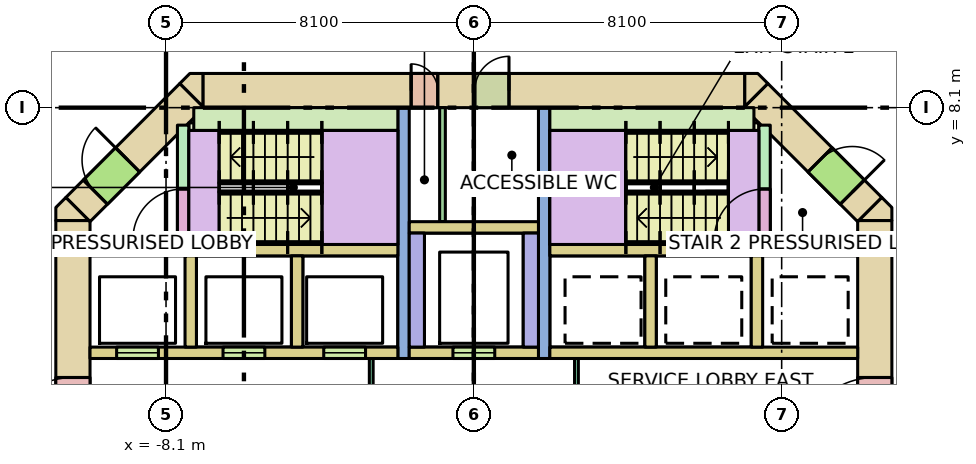
"""IFC4 building model, lengths in metres.
Left out: names, types, materials, properties, quantities, classifications, styles, units other than length and angle.
Written with IfcOpenShell. Run it as: python <this file> out.ifc"""

import sys

from ifc_helpers import new_model, si_unit, direction, frame, frame_2d, origin, place, context, subcontext, project, spatial, polyline, rectangle, outline, extrude, element, fill, save


model = new_model("IFC4")
c1 = context("Model", 3, precision=1e-05, world=origin(), true_north=direction((0.0, 1.0)))
c2 = subcontext(c1, "Body", "Model", "MODEL_VIEW")
j1 = project(units=[si_unit("LENGTHUNIT", "METRE"), si_unit("PLANEANGLEUNIT", "RADIAN")], contexts=[c1])
p1 = place(None, origin())
s1 = spatial("IfcSite", under=j1, at=p1, CompositionType="ELEMENT")
p2 = place(p1, origin())
s2 = spatial("IfcBuilding", under=s1, at=p2, CompositionType="ELEMENT")
p3 = place(p2, frame((0.0, 0.0, 13.0)))
s3 = spatial("IfcBuildingStorey", under=s2, at=p3, CompositionType="ELEMENT", Elevation=13.0)
p4 = place(p3, frame((-7.13, 8.55, -0.32), z_axis=(0.0, 0.0, 1.0), x_axis=(1.0, 0.0, 0.0)))
e1 = element("IfcWall", 1, at=p4, inside=s3, PredefinedType="SHEAR", context=c2, shape_type="SweptSolid", body=[
    extrude(rectangle(XDim=14.26, YDim=0.9, at=frame_2d((7.13, 0.0))), origin(), (0.0, 0.0, 1.0), 7.0),
])
p5 = place(p4, frame((5.48, 0.0, 0.32)))
e2 = element("IfcOpeningElement", 2, at=p5, cuts=e1, PredefinedType="OPENING", context=c2, shape_type="SweptSolid", body=[
    extrude(rectangle(XDim=0.7, YDim=2.1, at=frame_2d((0.35, 1.05))), frame((0.0, 0.46, 0.0), z_axis=(0.0, -1.0, 0.0), x_axis=(1.0, 0.0, 0.0)), (0.0, 0.0, 1.0), 0.92),
])
p6 = place(p4, frame((7.155, 0.0, 0.32)))
e3 = element("IfcOpeningElement", 3, at=p6, cuts=e1, PredefinedType="OPENING", context=c2, shape_type="SweptSolid", body=[
    extrude(rectangle(XDim=0.9, YDim=2.1, at=frame_2d((0.45, 1.05))), frame((0.0, 0.46, 0.0), z_axis=(0.0, -1.0, 0.0), x_axis=(1.0, 0.0, 0.0)), (0.0, 0.0, 1.0), 0.92),
])
p7 = place(p3, frame((-10.55, -5.13, -0.32), z_axis=(0.0, 0.0, 1.0), x_axis=(0.0, 1.0, 0.0)))
e4 = element("IfcWall", 4, at=p7, inside=s3, PredefinedType="SHEAR", context=c2, shape_type="SweptSolid", body=[
    extrude(rectangle(XDim=10.26, YDim=0.9, at=frame_2d((5.13, 0.0))), origin(), (0.0, 0.0, 1.0), 7.0),
])
p8 = place(p7, frame((4.13, 0.0, 0.32)))
e5 = element("IfcOpeningElement", 5, at=p8, cuts=e4, PredefinedType="OPENING", context=c2, shape_type="SweptSolid", body=[
    extrude(rectangle(XDim=2.0, YDim=2.1, at=frame_2d((1.0, 1.05))), frame((0.0, 0.46, 0.0), z_axis=(0.0, -1.0, 0.0), x_axis=(1.0, 0.0, 0.0)), (0.0, 0.0, 1.0), 0.92),
])
p9 = place(p3, frame((10.55, -5.13, -0.32), z_axis=(0.0, 0.0, 1.0), x_axis=(0.0, 1.0, 0.0)))
e6 = element("IfcWall", 6, at=p9, inside=s3, PredefinedType="SHEAR", context=c2, shape_type="SweptSolid", body=[
    extrude(rectangle(XDim=10.26, YDim=0.9, at=frame_2d((5.13, 0.0))), origin(), (0.0, 0.0, 1.0), 7.0),
])
p10 = place(p9, frame((4.13, 0.0, 0.32)))
e7 = element("IfcOpeningElement", 7, at=p10, cuts=e6, PredefinedType="OPENING", context=c2, shape_type="SweptSolid", body=[
    extrude(rectangle(XDim=2.0, YDim=2.1, at=frame_2d((1.0, 1.05))), frame((0.0, 0.46, 0.0), z_axis=(0.0, -1.0, 0.0), x_axis=(1.0, 0.0, 0.0)), (0.0, 0.0, 1.0), 0.92),
])
p11 = place(p3, frame((-10.418, 5.418, -0.32), z_axis=(0.0, 0.0, 1.0), x_axis=(0.707106781187, 0.707106781187, 0.0)))
e8 = element("IfcWall", 8, at=p11, inside=s3, PredefinedType="SHEAR", context=c2, shape_type="SweptSolid", body=[
    extrude(rectangle(XDim=4.243, YDim=0.9, at=frame_2d((2.121, 0.0))), origin(), (0.0, 0.0, 1.0), 7.0),
])
p12 = place(p11, frame((0.65, 0.0, 0.32)))
e9 = element("IfcOpeningElement", 9, at=p12, cuts=e8, PredefinedType="OPENING", context=c2, shape_type="SweptSolid", body=[
    extrude(rectangle(XDim=1.2, YDim=2.1, at=frame_2d((0.6, 1.05))), frame((0.0, 0.46, 0.0), z_axis=(0.0, -1.0, 0.0), x_axis=(1.0, 0.0, 0.0)), (0.0, 0.0, 1.0), 0.92),
])
p13 = place(p3, frame((7.418, 8.418, -0.32), z_axis=(0.0, 0.0, 1.0), x_axis=(0.707106781187, -0.707106781187, 0.0)))
e10 = element("IfcWall", 10, at=p13, inside=s3, PredefinedType="SHEAR", context=c2, shape_type="SweptSolid", body=[
    extrude(rectangle(XDim=4.243, YDim=0.9, at=frame_2d((2.121, 0.0))), origin(), (0.0, 0.0, 1.0), 7.0),
])
p14 = place(p13, frame((2.393, 0.0, 0.32)))
e11 = element("IfcOpeningElement", 11, at=p14, cuts=e10, PredefinedType="OPENING", context=c2, shape_type="SweptSolid", body=[
    extrude(rectangle(XDim=1.2, YDim=2.1, at=frame_2d((0.6, 1.05))), frame((0.0, 0.46, 0.0), z_axis=(0.0, -1.0, 0.0), x_axis=(1.0, 0.0, 0.0)), (0.0, 0.0, 1.0), 0.92),
])
p15 = place(p3, frame((0.0, 0.0, -0.32)))
e12 = element("IfcWall", 12, at=p15, inside=s3, PredefinedType="SHEAR", context=c2, shape_type="SweptSolid", body=[
    extrude(outline(polyline([(-10.736, 5.736), (-10.13, 5.13), (-11.0, 5.13), (-11.0, 5.473), (-10.736, 5.736)])), origin(), (0.0, 0.0, 1.0), 7.0),
])
p16 = place(p3, frame((0.0, 0.0, -0.32)))
e13 = element("IfcWall", 13, at=p16, inside=s3, PredefinedType="SHEAR", context=c2, shape_type="SweptSolid", body=[
    extrude(outline(polyline([(11.0, 5.473), (11.0, 5.13), (10.13, 5.13), (10.736, 5.736), (11.0, 5.473)])), origin(), (0.0, 0.0, 1.0), 7.0),
])
p17 = place(p3, frame((0.0, 0.0, -0.32)))
e14 = element("IfcWall", 14, at=p17, inside=s3, PredefinedType="SHEAR", context=c2, shape_type="SweptSolid", body=[
    extrude(outline(polyline([(-7.473, 9.0), (-7.13, 9.0), (-7.13, 8.13), (-7.736, 8.736), (-7.473, 9.0)])), origin(), (0.0, 0.0, 1.0), 7.0),
])
p18 = place(p3, frame((0.0, 0.0, -0.32)))
e15 = element("IfcWall", 15, at=p18, inside=s3, PredefinedType="SHEAR", context=c2, shape_type="SweptSolid", body=[
    extrude(outline(polyline([(7.473, 9.0), (7.736, 8.736), (7.13, 8.13), (7.13, 9.0), (7.473, 9.0)])), origin(), (0.0, 0.0, 1.0), 7.0),
])
for number, where, z_axis, x_axis in (
    (16, (-10.1, 4.35, 0.0), (0.0, 0.0, 1.0), (1.0, 0.0, 0.0)),
    (17, (2.0, 4.35, 0.0), (0.0, 0.0, 1.0), (1.0, 0.0, 0.0)),
):
    element("IfcWall", number, at=place(p3, frame(where, z_axis=z_axis, x_axis=x_axis)), inside=s3, PredefinedType="SOLIDWALL", context=c2, shape_type="SweptSolid", body=[
        extrude(rectangle(XDim=8.1, YDim=0.3, at=frame_2d((4.05, 0.0))), origin(), (0.0, 0.0, 1.0), 6.68),
    ])
p19 = place(p3, frame((-10.1, 1.65, 0.0), z_axis=(0.0, 0.0, 1.0), x_axis=(1.0, 0.0, 0.0)))
e18 = element("IfcWall", 18, at=p19, inside=s3, PredefinedType="SOLIDWALL", context=c2, shape_type="SweptSolid", body=[
    extrude(rectangle(XDim=8.1, YDim=0.3, at=frame_2d((4.05, 0.0))), origin(), (0.0, 0.0, 1.0), 6.68),
])
p20 = place(p19, frame((0.7, 0.0, 0.0)))
e19 = element("IfcOpeningElement", 19, at=p20, cuts=e18, PredefinedType="OPENING", context=c2, shape_type="SweptSolid", body=[
    extrude(rectangle(XDim=1.1, YDim=2.1, at=frame_2d((0.55, 1.05))), frame((0.0, 0.16, 0.0), z_axis=(0.0, -1.0, 0.0), x_axis=(1.0, 0.0, 0.0)), (0.0, 0.0, 1.0), 0.32),
])
p21 = place(p19, frame((3.5, 0.0, 0.0)))
e20 = element("IfcOpeningElement", 20, at=p21, cuts=e18, PredefinedType="OPENING", context=c2, shape_type="SweptSolid", body=[
    extrude(rectangle(XDim=1.1, YDim=2.1, at=frame_2d((0.55, 1.05))), frame((0.0, 0.16, 0.0), z_axis=(0.0, -1.0, 0.0), x_axis=(1.0, 0.0, 0.0)), (0.0, 0.0, 1.0), 0.32),
])
p22 = place(p19, frame((6.15, 0.0, 0.0)))
e21 = element("IfcOpeningElement", 21, at=p22, cuts=e18, PredefinedType="OPENING", context=c2, shape_type="SweptSolid", body=[
    extrude(rectangle(XDim=1.1, YDim=2.1, at=frame_2d((0.55, 1.05))), frame((0.0, 0.16, 0.0), z_axis=(0.0, -1.0, 0.0), x_axis=(1.0, 0.0, 0.0)), (0.0, 0.0, 1.0), 0.32),
])
p23 = place(p3, frame((2.0, 1.65, 0.0), z_axis=(0.0, 0.0, 1.0), x_axis=(1.0, 0.0, 0.0)))
e22 = element("IfcWall", 22, at=p23, inside=s3, PredefinedType="SOLIDWALL", context=c2, shape_type="SweptSolid", body=[
    extrude(rectangle(XDim=8.1, YDim=0.3, at=frame_2d((4.05, 0.0))), origin(), (0.0, 0.0, 1.0), 6.68),
])
for number, where, z_axis, x_axis in (
    (23, (-7.45, 1.8, 0.0), (0.0, 0.0, 1.0), (0.0, 1.0, 0.0)),
    (24, (-4.65, 1.8, 0.0), (0.0, 0.0, 1.0), (0.0, 1.0, 0.0)),
    (25, (4.65, 1.8, 0.0), (0.0, 0.0, 1.0), (0.0, 1.0, 0.0)),
    (26, (7.45, 1.8, 0.0), (0.0, 0.0, 1.0), (0.0, 1.0, 0.0)),
):
    element("IfcWall", number, at=place(p3, frame(where, z_axis=z_axis, x_axis=x_axis)), inside=s3, PredefinedType="SOLIDWALL", context=c2, shape_type="SweptSolid", body=[
        extrude(rectangle(XDim=2.4, YDim=0.3, at=frame_2d((1.2, 0.0))), origin(), (0.0, 0.0, 1.0), 6.68),
    ])
for number, where, z_axis, x_axis in (
    (27, (-1.85, 1.5, 0.0), (0.0, 0.0, 1.0), (0.0, 1.0, 0.0)),
    (28, (1.85, 1.5, 0.0), (0.0, 0.0, 1.0), (0.0, 1.0, 0.0)),
):
    element("IfcWall", number, at=place(p3, frame(where, z_axis=z_axis, x_axis=x_axis)), inside=s3, PredefinedType="SHEAR", context=c2, shape_type="SweptSolid", body=[
        extrude(rectangle(XDim=6.6, YDim=0.3, at=frame_2d((3.3, 0.0))), origin(), (0.0, 0.0, 1.0), 6.68),
    ])
p24 = place(p3, frame((-1.7, 1.65, 0.0), z_axis=(0.0, 0.0, 1.0), x_axis=(1.0, 0.0, 0.0)))
e29 = element("IfcWall", 29, at=p24, inside=s3, PredefinedType="SOLIDWALL", context=c2, shape_type="SweptSolid", body=[
    extrude(rectangle(XDim=3.4, YDim=0.3, at=frame_2d((1.7, 0.0))), origin(), (0.0, 0.0, 1.0), 6.68),
])
p25 = place(p24, frame((1.15, 0.0, 0.0)))
e30 = element("IfcOpeningElement", 30, at=p25, cuts=e29, PredefinedType="OPENING", context=c2, shape_type="SweptSolid", body=[
    extrude(rectangle(XDim=1.1, YDim=2.1, at=frame_2d((0.55, 1.05))), frame((0.0, 0.16, 0.0), z_axis=(0.0, -1.0, 0.0), x_axis=(1.0, 0.0, 0.0)), (0.0, 0.0, 1.0), 0.32),
])
for number, where, z_axis, x_axis in (
    (31, (-1.5, 1.8, 0.0), (0.0, 0.0, 1.0), (0.0, 1.0, 0.0)),
    (32, (1.5, 1.8, 0.0), (0.0, 0.0, 1.0), (0.0, 1.0, 0.0)),
):
    element("IfcWall", number, at=place(p3, frame(where, z_axis=z_axis, x_axis=x_axis)), inside=s3, PredefinedType="SOLIDWALL", context=c2, shape_type="SweptSolid", body=[
        extrude(rectangle(XDim=3.0, YDim=0.4, at=frame_2d((1.5, 0.0))), origin(), (0.0, 0.0, 1.0), 6.68),
    ])
p26 = place(p3, frame((-1.7, 4.95, 0.0), z_axis=(0.0, 0.0, 1.0), x_axis=(1.0, 0.0, 0.0)))
e33 = element("IfcWall", 33, at=p26, inside=s3, PredefinedType="SOLIDWALL", context=c2, shape_type="SweptSolid", body=[
    extrude(rectangle(XDim=3.4, YDim=0.3, at=frame_2d((1.7, 0.0))), origin(), (0.0, 0.0, 1.0), 6.68),
])
p27 = place(p3, frame((-7.65, 4.5, 0.0), z_axis=(0.0, 0.0, 1.0), x_axis=(0.0, 1.0, 0.0)))
e34 = element("IfcWall", 34, at=p27, inside=s3, PredefinedType="SHEAR", context=c2, shape_type="SweptSolid", body=[
    extrude(rectangle(XDim=3.14, YDim=0.3, at=frame_2d((1.57, 0.0))), origin(), (0.0, 0.0, 1.0), 6.68),
])
p28 = place(p27, frame((0.14, 0.0, 0.0)))
e35 = element("IfcOpeningElement", 35, at=p28, cuts=e34, PredefinedType="OPENING", context=c2, shape_type="SweptSolid", body=[
    extrude(rectangle(XDim=1.32, YDim=2.1, at=frame_2d((0.66, 1.05))), frame((0.0, 0.16, 0.0), z_axis=(0.0, -1.0, 0.0), x_axis=(1.0, 0.0, 0.0)), (0.0, 0.0, 1.0), 0.32),
])
p29 = place(p3, frame((-7.37, 7.8, 0.0), z_axis=(0.0, 0.0, 1.0), x_axis=(1.0, 0.0, 0.0)))
e36 = element("IfcWall", 36, at=p29, inside=s3, PredefinedType="SHEAR", context=c2, shape_type="SweptSolid", body=[
    extrude(rectangle(XDim=5.37, YDim=0.6, at=frame_2d((2.685, 0.0))), origin(), (0.0, 0.0, 1.0), 6.68),
])
p30 = place(p3, frame((7.65, 4.5, 0.0), z_axis=(0.0, 0.0, 1.0), x_axis=(0.0, 1.0, 0.0)))
e37 = element("IfcWall", 37, at=p30, inside=s3, PredefinedType="SHEAR", context=c2, shape_type="SweptSolid", body=[
    extrude(rectangle(XDim=3.14, YDim=0.3, at=frame_2d((1.57, 0.0))), origin(), (0.0, 0.0, 1.0), 6.68),
])
p31 = place(p30, frame((0.14, 0.0, 0.0)))
e38 = element("IfcOpeningElement", 38, at=p31, cuts=e37, PredefinedType="OPENING", context=c2, shape_type="SweptSolid", body=[
    extrude(rectangle(XDim=1.32, YDim=2.1, at=frame_2d((0.66, 1.05))), frame((0.0, 0.16, 0.0), z_axis=(0.0, -1.0, 0.0), x_axis=(1.0, 0.0, 0.0)), (0.0, 0.0, 1.0), 0.32),
])
p32 = place(p3, frame((2.0, 7.8, 0.0), z_axis=(0.0, 0.0, 1.0), x_axis=(1.0, 0.0, 0.0)))
e39 = element("IfcWall", 39, at=p32, inside=s3, PredefinedType="SHEAR", context=c2, shape_type="SweptSolid", body=[
    extrude(rectangle(XDim=5.37, YDim=0.6, at=frame_2d((2.685, 0.0))), origin(), (0.0, 0.0, 1.0), 6.68),
])
for number, where, z_axis, x_axis in (
    (40, (-7.5, 7.6, 0.0), (0.0, 0.0, 1.0), (1.0, 0.0, 0.0)),
    (41, (6.9, 7.6, 0.0), (0.0, 0.0, 1.0), (1.0, 0.0, 0.0)),
):
    element("IfcWall", number, at=place(p3, frame(where, z_axis=z_axis, x_axis=x_axis)), inside=s3, PredefinedType="SHEAR", context=c2, shape_type="SweptSolid", body=[
        extrude(rectangle(XDim=0.6, YDim=0.2, at=frame_2d((0.3, 0.0))), origin(), (0.0, 0.0, 1.0), 6.68),
    ])
p33 = place(p3, frame((-2.7, -1.5, 0.0), z_axis=(0.0, 0.0, 1.0), x_axis=(0.0, 1.0, 0.0)))
e42 = element("IfcWall", 42, at=p33, inside=s3, PredefinedType="PARTITIONING", context=c2, shape_type="SweptSolid", body=[
    extrude(rectangle(XDim=3.0, YDim=0.1, at=frame_2d((1.5, 0.0))), origin(), (0.0, 0.0, 1.0), 6.68),
])
p34 = place(p33, frame((0.9, 0.0, 0.0)))
e43 = element("IfcOpeningElement", 43, at=p34, cuts=e42, PredefinedType="OPENING", context=c2, shape_type="SweptSolid", body=[
    extrude(rectangle(XDim=1.2, YDim=2.1, at=frame_2d((0.6, 1.05))), frame((0.0, 0.06, 0.0), z_axis=(0.0, -1.0, 0.0), x_axis=(1.0, 0.0, 0.0)), (0.0, 0.0, 1.0), 0.12),
])
p35 = place(p3, frame((2.7, -1.5, 0.0), z_axis=(0.0, 0.0, 1.0), x_axis=(0.0, 1.0, 0.0)))
e44 = element("IfcWall", 44, at=p35, inside=s3, PredefinedType="PARTITIONING", context=c2, shape_type="SweptSolid", body=[
    extrude(rectangle(XDim=3.0, YDim=0.1, at=frame_2d((1.5, 0.0))), origin(), (0.0, 0.0, 1.0), 6.68),
])
p36 = place(p35, frame((0.9, 0.0, 0.0)))
e45 = element("IfcOpeningElement", 45, at=p36, cuts=e44, PredefinedType="OPENING", context=c2, shape_type="SweptSolid", body=[
    extrude(rectangle(XDim=1.2, YDim=2.1, at=frame_2d((0.6, 1.05))), frame((0.0, 0.06, 0.0), z_axis=(0.0, -1.0, 0.0), x_axis=(1.0, 0.0, 0.0)), (0.0, 0.0, 1.0), 0.12),
])
p37 = place(p3, frame((-0.825, 5.1, 0.0), z_axis=(0.0, 0.0, 1.0), x_axis=(0.0, 1.0, 0.0)))
e46 = element("IfcWall", 46, at=p37, inside=s3, PredefinedType="PARTITIONING", context=c2, shape_type="SweptSolid", body=[
    extrude(rectangle(XDim=3.0, YDim=0.15, at=frame_2d((1.5, 0.0))), origin(), (0.0, 0.0, 1.0), 6.68),
])
p38 = place(p20, origin())
e47 = element("IfcDoor", 47, at=p38, inside=s3, OperationType="DOUBLE_DOOR_SLIDING", PredefinedType="DOOR", context=c2, shape_type="SweptSolid", body=[
    extrude(rectangle(XDim=1.1, YDim=2.1, at=frame_2d((0.55, 1.05))), frame((0.0, 0.025, 0.0), z_axis=(0.0, -1.0, 0.0), x_axis=(1.0, 0.0, 0.0)), (0.0, 0.0, 1.0), 0.05),
])
fill(e19, e47)
p39 = place(p21, origin())
e48 = element("IfcDoor", 48, at=p39, inside=s3, OperationType="DOUBLE_DOOR_SLIDING", PredefinedType="DOOR", context=c2, shape_type="SweptSolid", body=[
    extrude(rectangle(XDim=1.1, YDim=2.1, at=frame_2d((0.55, 1.05))), frame((0.0, 0.025, 0.0), z_axis=(0.0, -1.0, 0.0), x_axis=(1.0, 0.0, 0.0)), (0.0, 0.0, 1.0), 0.05),
])
fill(e20, e48)
p40 = place(p22, origin())
e49 = element("IfcDoor", 49, at=p40, inside=s3, OperationType="DOUBLE_DOOR_SLIDING", PredefinedType="DOOR", context=c2, shape_type="SweptSolid", body=[
    extrude(rectangle(XDim=1.1, YDim=2.1, at=frame_2d((0.55, 1.05))), frame((0.0, 0.025, 0.0), z_axis=(0.0, -1.0, 0.0), x_axis=(1.0, 0.0, 0.0)), (0.0, 0.0, 1.0), 0.05),
])
fill(e21, e49)
p41 = place(p25, origin())
e50 = element("IfcDoor", 50, at=p41, inside=s3, OperationType="DOUBLE_DOOR_SLIDING", PredefinedType="DOOR", context=c2, shape_type="SweptSolid", body=[
    extrude(rectangle(XDim=1.1, YDim=2.1, at=frame_2d((0.55, 1.05))), frame((0.0, 0.025, 0.0), z_axis=(0.0, -1.0, 0.0), x_axis=(1.0, 0.0, 0.0)), (0.0, 0.0, 1.0), 0.05),
])
fill(e30, e50)
p42 = place(p28, origin())
e51 = element("IfcDoor", 51, at=p42, inside=s3, OperationType="DOUBLE_DOOR_SINGLE_SWING", PredefinedType="DOOR", context=c2, shape_type="SweptSolid", body=[
    extrude(rectangle(XDim=1.32, YDim=2.1, at=frame_2d((0.66, 1.05))), frame((0.0, 0.025, 0.0), z_axis=(0.0, -1.0, 0.0), x_axis=(1.0, 0.0, 0.0)), (0.0, 0.0, 1.0), 0.05),
])
fill(e35, e51)
p43 = place(p12, origin())
e52 = element("IfcDoor", 52, at=p43, inside=s3, OperationType="SINGLE_SWING_RIGHT", PredefinedType="DOOR", context=c2, shape_type="SweptSolid", body=[
    extrude(rectangle(XDim=1.2, YDim=2.1, at=frame_2d((0.6, 1.05))), frame((0.0, 0.025, 0.0), z_axis=(0.0, -1.0, 0.0), x_axis=(1.0, 0.0, 0.0)), (0.0, 0.0, 1.0), 0.05),
])
fill(e9, e52)
p44 = place(p31, origin())
e53 = element("IfcDoor", 53, at=p44, inside=s3, OperationType="DOUBLE_DOOR_SINGLE_SWING", PredefinedType="DOOR", context=c2, shape_type="SweptSolid", body=[
    extrude(rectangle(XDim=1.32, YDim=2.1, at=frame_2d((0.66, 1.05))), frame((0.0, 0.025, 0.0), z_axis=(0.0, -1.0, 0.0), x_axis=(1.0, 0.0, 0.0)), (0.0, 0.0, 1.0), 0.05),
])
fill(e38, e53)
p45 = place(p14, origin())
e54 = element("IfcDoor", 54, at=p45, inside=s3, OperationType="SINGLE_SWING_RIGHT", PredefinedType="DOOR", context=c2, shape_type="SweptSolid", body=[
    extrude(rectangle(XDim=1.2, YDim=2.1, at=frame_2d((0.6, 1.05))), frame((0.0, 0.025, 0.0), z_axis=(0.0, -1.0, 0.0), x_axis=(1.0, 0.0, 0.0)), (0.0, 0.0, 1.0), 0.05),
])
fill(e11, e54)
p46 = place(p8, origin())
e55 = element("IfcDoor", 55, at=p46, inside=s3, OperationType="DOUBLE_DOOR_SINGLE_SWING", PredefinedType="DOOR", context=c2, shape_type="SweptSolid", body=[
    extrude(rectangle(XDim=2.0, YDim=2.1, at=frame_2d((1.0, 1.05))), frame((0.0, 0.025, 0.0), z_axis=(0.0, -1.0, 0.0), x_axis=(1.0, 0.0, 0.0)), (0.0, 0.0, 1.0), 0.05),
])
fill(e5, e55)
p47 = place(p10, origin())
e56 = element("IfcDoor", 56, at=p47, inside=s3, OperationType="DOUBLE_DOOR_SINGLE_SWING", PredefinedType="DOOR", context=c2, shape_type="SweptSolid", body=[
    extrude(rectangle(XDim=2.0, YDim=2.1, at=frame_2d((1.0, 1.05))), frame((0.0, 0.025, 0.0), z_axis=(0.0, -1.0, 0.0), x_axis=(1.0, 0.0, 0.0)), (0.0, 0.0, 1.0), 0.05),
])
fill(e7, e56)
p48 = place(p5, origin())
e57 = element("IfcDoor", 57, at=p48, inside=s3, OperationType="SINGLE_SWING_LEFT", PredefinedType="DOOR", context=c2, shape_type="SweptSolid", body=[
    extrude(rectangle(XDim=0.7, YDim=2.1, at=frame_2d((0.35, 1.05))), frame((0.0, 0.025, 0.0), z_axis=(0.0, -1.0, 0.0), x_axis=(1.0, 0.0, 0.0)), (0.0, 0.0, 1.0), 0.05),
])
fill(e2, e57)
p49 = place(p6, origin())
e58 = element("IfcDoor", 58, at=p49, inside=s3, OperationType="SINGLE_SWING_RIGHT", PredefinedType="DOOR", context=c2, shape_type="SweptSolid", body=[
    extrude(rectangle(XDim=0.9, YDim=2.1, at=frame_2d((0.45, 1.05))), frame((0.0, 0.025, 0.0), z_axis=(0.0, -1.0, 0.0), x_axis=(1.0, 0.0, 0.0)), (0.0, 0.0, 1.0), 0.05),
])
fill(e3, e58)
save(model, sys.argv[1])
